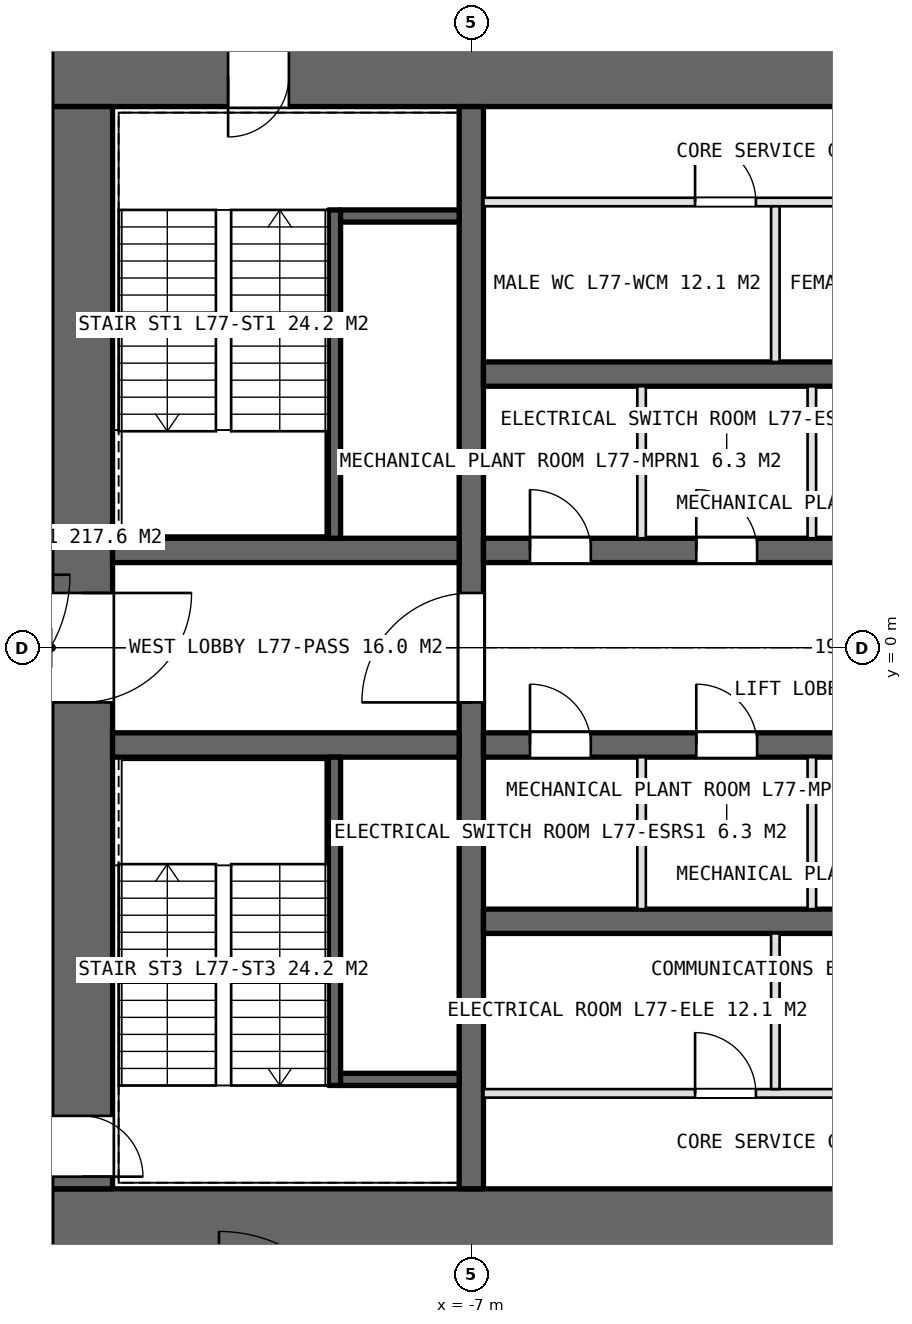
"""IFC4 building model, lengths in metres.
Left out: names, types, materials, properties, quantities, classifications, styles, units other than length and angle.
Written with IfcOpenShell. Run it as: python <this file> out.ifc"""

import sys

from ifc_helpers import new_model, si_unit, direction, frame, frame_2d, origin, place, context, subcontext, project, spatial, rectangle, extrude, element, fill, save


model = new_model("IFC4")
c1 = context("Model", 3, precision=1e-05, world=origin(), true_north=direction((0.0, 1.0)))
c2 = subcontext(c1, "Body", "Model", "MODEL_VIEW")
j1 = project(units=[si_unit("LENGTHUNIT", "METRE"), si_unit("PLANEANGLEUNIT", "RADIAN")], contexts=[c1])
p1 = place(None, origin())
s1 = spatial("IfcSite", under=j1, at=p1, CompositionType="ELEMENT")
p2 = place(p1, origin())
s2 = spatial("IfcBuilding", under=s1, at=p2, CompositionType="ELEMENT")
p3 = place(p2, frame((0.0, 0.0, 344.2)))
s3 = spatial("IfcBuildingStorey", under=s2, at=p3, CompositionType="ELEMENT", Elevation=344.2)
p4 = place(p3, frame((-13.9, -9.4, 0.0), z_axis=(0.0, 0.0, 1.0), x_axis=(1.0, 0.0, 0.0)))
e1 = element("IfcWall", 1, at=p4, inside=s3, PredefinedType="SHEAR", context=c2, shape_type="SweptSolid", body=[
    extrude(rectangle(XDim=27.8, YDim=1.0, at=frame_2d((13.9, 0.0))), origin(), (0.0, 0.0, 1.0), 5.0),
])
p5 = place(p4, frame((13.0, 0.0, 0.0)))
e2 = element("IfcOpeningElement", 2, at=p5, cuts=e1, PredefinedType="OPENING", context=c2, shape_type="SweptSolid", body=[
    extrude(rectangle(XDim=1.8, YDim=2.4, at=frame_2d((0.9, 1.2))), frame((0.0, 0.51, 0.0), z_axis=(0.0, -1.0, 0.0), x_axis=(1.0, 0.0, 0.0)), (0.0, 0.0, 1.0), 1.02),
])
p6 = place(p4, frame((22.95, 0.0, 0.0)))
e3 = element("IfcOpeningElement", 3, at=p6, cuts=e1, PredefinedType="OPENING", context=c2, shape_type="SweptSolid", body=[
    extrude(rectangle(XDim=2.2, YDim=2.7, at=frame_2d((1.1, 1.35))), frame((0.0, 0.51, 0.0), z_axis=(0.0, -1.0, 0.0), x_axis=(1.0, 0.0, 0.0)), (0.0, 0.0, 1.0), 1.02),
])
p7 = place(p3, frame((13.9, 9.4, 0.0), z_axis=(0.0, 0.0, 1.0), x_axis=(-1.0, 0.0, 0.0)))
e4 = element("IfcWall", 4, at=p7, inside=s3, PredefinedType="SHEAR", context=c2, shape_type="SweptSolid", body=[
    extrude(rectangle(XDim=27.8, YDim=1.0, at=frame_2d((13.9, 0.0))), origin(), (0.0, 0.0, 1.0), 5.0),
])
p8 = place(p7, frame((23.9, 0.0, 0.0)))
e5 = element("IfcOpeningElement", 5, at=p8, cuts=e4, PredefinedType="OPENING", context=c2, shape_type="SweptSolid", body=[
    extrude(rectangle(XDim=1.0, YDim=2.4, at=frame_2d((0.5, 1.2))), frame((0.0, 0.51, 0.0), z_axis=(0.0, -1.0, 0.0), x_axis=(1.0, 0.0, 0.0)), (0.0, 0.0, 1.0), 1.02),
])
p9 = place(p7, frame((13.0, 0.0, 0.0)))
e6 = element("IfcOpeningElement", 6, at=p9, cuts=e4, PredefinedType="OPENING", context=c2, shape_type="SweptSolid", body=[
    extrude(rectangle(XDim=1.8, YDim=2.4, at=frame_2d((0.9, 1.2))), frame((0.0, 0.51, 0.0), z_axis=(0.0, -1.0, 0.0), x_axis=(1.0, 0.0, 0.0)), (0.0, 0.0, 1.0), 1.02),
])
p10 = place(p3, frame((-13.4, 8.9, 0.0), z_axis=(0.0, 0.0, 1.0), x_axis=(0.0, -1.0, 0.0)))
e7 = element("IfcWall", 7, at=p10, inside=s3, PredefinedType="SHEAR", context=c2, shape_type="SweptSolid", body=[
    extrude(rectangle(XDim=17.8, YDim=1.0, at=frame_2d((8.9, 0.0))), origin(), (0.0, 0.0, 1.0), 5.0),
])
p11 = place(p10, frame((8.0, 0.0, 0.0)))
e8 = element("IfcOpeningElement", 8, at=p11, cuts=e7, PredefinedType="OPENING", context=c2, shape_type="SweptSolid", body=[
    extrude(rectangle(XDim=1.8, YDim=2.4, at=frame_2d((0.9, 1.2))), frame((0.0, 0.51, 0.0), z_axis=(0.0, -1.0, 0.0), x_axis=(1.0, 0.0, 0.0)), (0.0, 0.0, 1.0), 1.02),
])
p12 = place(p10, frame((16.6, 0.0, 0.0)))
e9 = element("IfcOpeningElement", 9, at=p12, cuts=e7, PredefinedType="OPENING", context=c2, shape_type="SweptSolid", body=[
    extrude(rectangle(XDim=1.0, YDim=2.4, at=frame_2d((0.5, 1.2))), frame((0.0, 0.51, 0.0), z_axis=(0.0, -1.0, 0.0), x_axis=(1.0, 0.0, 0.0)), (0.0, 0.0, 1.0), 1.02),
])
p13 = place(p3, frame((-7.0, -8.9, 0.0), z_axis=(0.0, 0.0, 1.0), x_axis=(0.0, 1.0, 0.0)))
e10 = element("IfcWall", 10, at=p13, inside=s3, PredefinedType="SHEAR", context=c2, shape_type="SweptSolid", body=[
    extrude(rectangle(XDim=17.8, YDim=0.4, at=frame_2d((8.9, 0.0))), origin(), (0.0, 0.0, 1.0), 5.0),
])
p14 = place(p13, frame((8.0, 0.0, 0.0)))
e11 = element("IfcOpeningElement", 11, at=p14, cuts=e10, PredefinedType="OPENING", context=c2, shape_type="SweptSolid", body=[
    extrude(rectangle(XDim=1.8, YDim=2.4, at=frame_2d((0.9, 1.2))), frame((0.0, 0.21, 0.0), z_axis=(0.0, -1.0, 0.0), x_axis=(1.0, 0.0, 0.0)), (0.0, 0.0, 1.0), 0.42),
])
p15 = place(p3, frame((-6.8, 1.6, 0.0), z_axis=(0.0, 0.0, 1.0), x_axis=(1.0, 0.0, 0.0)))
e12 = element("IfcWall", 12, at=p15, inside=s3, PredefinedType="SHEAR", context=c2, shape_type="SweptSolid", body=[
    extrude(rectangle(XDim=13.6, YDim=0.4, at=frame_2d((6.8, 0.0))), origin(), (0.0, 0.0, 1.0), 5.0),
])
p16 = place(p15, frame((0.765, 0.0, 0.0)))
e13 = element("IfcOpeningElement", 13, at=p16, cuts=e12, PredefinedType="OPENING", context=c2, shape_type="SweptSolid", body=[
    extrude(rectangle(XDim=1.0, YDim=2.4, at=frame_2d((0.5, 1.2))), frame((0.0, 0.21, 0.0), z_axis=(0.0, -1.0, 0.0), x_axis=(1.0, 0.0, 0.0)), (0.0, 0.0, 1.0), 0.42),
])
p17 = place(p15, frame((3.5, 0.0, 0.0)))
e14 = element("IfcOpeningElement", 14, at=p17, cuts=e12, PredefinedType="OPENING", context=c2, shape_type="SweptSolid", body=[
    extrude(rectangle(XDim=1.0, YDim=2.4, at=frame_2d((0.5, 1.2))), frame((0.0, 0.21, 0.0), z_axis=(0.0, -1.0, 0.0), x_axis=(1.0, 0.0, 0.0)), (0.0, 0.0, 1.0), 0.42),
])
p18 = place(p15, frame((6.3, 0.0, 0.0)))
e15 = element("IfcOpeningElement", 15, at=p18, cuts=e12, PredefinedType="OPENING", context=c2, shape_type="SweptSolid", body=[
    extrude(rectangle(XDim=1.0, YDim=2.4, at=frame_2d((0.5, 1.2))), frame((0.0, 0.21, 0.0), z_axis=(0.0, -1.0, 0.0), x_axis=(1.0, 0.0, 0.0)), (0.0, 0.0, 1.0), 0.42),
])
p19 = place(p15, frame((9.035, 0.0, 0.0)))
e16 = element("IfcOpeningElement", 16, at=p19, cuts=e12, PredefinedType="OPENING", context=c2, shape_type="SweptSolid", body=[
    extrude(rectangle(XDim=1.0, YDim=2.4, at=frame_2d((0.5, 1.2))), frame((0.0, 0.21, 0.0), z_axis=(0.0, -1.0, 0.0), x_axis=(1.0, 0.0, 0.0)), (0.0, 0.0, 1.0), 0.42),
])
p20 = place(p15, frame((11.9, 0.0, 0.0)))
e17 = element("IfcOpeningElement", 17, at=p20, cuts=e12, PredefinedType="OPENING", context=c2, shape_type="SweptSolid", body=[
    extrude(rectangle(XDim=1.0, YDim=2.4, at=frame_2d((0.5, 1.2))), frame((0.0, 0.21, 0.0), z_axis=(0.0, -1.0, 0.0), x_axis=(1.0, 0.0, 0.0)), (0.0, 0.0, 1.0), 0.42),
])
p21 = place(p3, frame((-6.8, -1.6, 0.0), z_axis=(0.0, 0.0, 1.0), x_axis=(1.0, 0.0, 0.0)))
e18 = element("IfcWall", 18, at=p21, inside=s3, PredefinedType="SHEAR", context=c2, shape_type="SweptSolid", body=[
    extrude(rectangle(XDim=13.6, YDim=0.4, at=frame_2d((6.8, 0.0))), origin(), (0.0, 0.0, 1.0), 5.0),
])
p22 = place(p21, frame((0.765, 0.0, 0.0)))
e19 = element("IfcOpeningElement", 19, at=p22, cuts=e18, PredefinedType="OPENING", context=c2, shape_type="SweptSolid", body=[
    extrude(rectangle(XDim=1.0, YDim=2.4, at=frame_2d((0.5, 1.2))), frame((0.0, 0.21, 0.0), z_axis=(0.0, -1.0, 0.0), x_axis=(1.0, 0.0, 0.0)), (0.0, 0.0, 1.0), 0.42),
])
p23 = place(p21, frame((3.5, 0.0, 0.0)))
e20 = element("IfcOpeningElement", 20, at=p23, cuts=e18, PredefinedType="OPENING", context=c2, shape_type="SweptSolid", body=[
    extrude(rectangle(XDim=1.0, YDim=2.4, at=frame_2d((0.5, 1.2))), frame((0.0, 0.21, 0.0), z_axis=(0.0, -1.0, 0.0), x_axis=(1.0, 0.0, 0.0)), (0.0, 0.0, 1.0), 0.42),
])
p24 = place(p21, frame((6.3, 0.0, 0.0)))
e21 = element("IfcOpeningElement", 21, at=p24, cuts=e18, PredefinedType="OPENING", context=c2, shape_type="SweptSolid", body=[
    extrude(rectangle(XDim=1.0, YDim=2.4, at=frame_2d((0.5, 1.2))), frame((0.0, 0.21, 0.0), z_axis=(0.0, -1.0, 0.0), x_axis=(1.0, 0.0, 0.0)), (0.0, 0.0, 1.0), 0.42),
])
p25 = place(p21, frame((9.035, 0.0, 0.0)))
e22 = element("IfcOpeningElement", 22, at=p25, cuts=e18, PredefinedType="OPENING", context=c2, shape_type="SweptSolid", body=[
    extrude(rectangle(XDim=1.0, YDim=2.4, at=frame_2d((0.5, 1.2))), frame((0.0, 0.21, 0.0), z_axis=(0.0, -1.0, 0.0), x_axis=(1.0, 0.0, 0.0)), (0.0, 0.0, 1.0), 0.42),
])
p26 = place(p21, frame((11.9, 0.0, 0.0)))
e23 = element("IfcOpeningElement", 23, at=p26, cuts=e18, PredefinedType="OPENING", context=c2, shape_type="SweptSolid", body=[
    extrude(rectangle(XDim=1.0, YDim=2.4, at=frame_2d((0.5, 1.2))), frame((0.0, 0.21, 0.0), z_axis=(0.0, -1.0, 0.0), x_axis=(1.0, 0.0, 0.0)), (0.0, 0.0, 1.0), 0.42),
])
for number, where, z_axis, x_axis in (
    (24, (-6.8, 4.5, 0.0), (0.0, 0.0, 1.0), (1.0, 0.0, 0.0)),
    (25, (-6.8, -4.5, 0.0), (0.0, 0.0, 1.0), (1.0, 0.0, 0.0)),
):
    element("IfcWall", number, at=place(p3, frame(where, z_axis=z_axis, x_axis=x_axis)), inside=s3, PredefinedType="SHEAR", context=c2, shape_type="SweptSolid", body=[
        extrude(rectangle(XDim=13.6, YDim=0.4, at=frame_2d((6.8, 0.0))), origin(), (0.0, 0.0, 1.0), 5.0),
    ])
for number, where, z_axis, x_axis in (
    (26, (-12.9, 1.6, 0.0), (0.0, 0.0, 1.0), (1.0, 0.0, 0.0)),
    (27, (-12.9, -1.6, 0.0), (0.0, 0.0, 1.0), (1.0, 0.0, 0.0)),
):
    element("IfcWall", number, at=place(p3, frame(where, z_axis=z_axis, x_axis=x_axis)), inside=s3, PredefinedType="SHEAR", context=c2, shape_type="SweptSolid", body=[
        extrude(rectangle(XDim=5.7, YDim=0.4, at=frame_2d((2.85, 0.0))), origin(), (0.0, 0.0, 1.0), 5.0),
    ])
p27 = place(p3, frame((-6.8, 7.33, 0.0), z_axis=(0.0, 0.0, 1.0), x_axis=(1.0, 0.0, 0.0)))
e28 = element("IfcWall", 28, at=p27, inside=s3, PredefinedType="PARTITIONING", context=c2, shape_type="SweptSolid", body=[
    extrude(rectangle(XDim=13.6, YDim=0.14, at=frame_2d((6.8, 0.0))), origin(), (0.0, 0.0, 1.0), 4.7),
])
p28 = place(p27, frame((3.48, 0.0, 0.0)))
e29 = element("IfcOpeningElement", 29, at=p28, cuts=e28, PredefinedType="OPENING", context=c2, shape_type="SweptSolid", body=[
    extrude(rectangle(XDim=1.0, YDim=2.4, at=frame_2d((0.5, 1.2))), frame((0.0, 0.08, 0.0), z_axis=(0.0, -1.0, 0.0), x_axis=(1.0, 0.0, 0.0)), (0.0, 0.0, 1.0), 0.16),
])
p29 = place(p27, frame((7.98, 0.0, 0.0)))
e30 = element("IfcOpeningElement", 30, at=p29, cuts=e28, PredefinedType="OPENING", context=c2, shape_type="SweptSolid", body=[
    extrude(rectangle(XDim=1.0, YDim=2.4, at=frame_2d((0.5, 1.2))), frame((0.0, 0.08, 0.0), z_axis=(0.0, -1.0, 0.0), x_axis=(1.0, 0.0, 0.0)), (0.0, 0.0, 1.0), 0.16),
])
p30 = place(p27, frame((10.38, 0.0, 0.0)))
e31 = element("IfcOpeningElement", 31, at=p30, cuts=e28, PredefinedType="OPENING", context=c2, shape_type="SweptSolid", body=[
    extrude(rectangle(XDim=1.1, YDim=2.4, at=frame_2d((0.55, 1.2))), frame((0.0, 0.08, 0.0), z_axis=(0.0, -1.0, 0.0), x_axis=(1.0, 0.0, 0.0)), (0.0, 0.0, 1.0), 0.16),
])
p31 = place(p27, frame((12.45, 0.0, 0.0)))
e32 = element("IfcOpeningElement", 32, at=p31, cuts=e28, PredefinedType="OPENING", context=c2, shape_type="SweptSolid", body=[
    extrude(rectangle(XDim=0.9, YDim=2.4, at=frame_2d((0.45, 1.2))), frame((0.0, 0.08, 0.0), z_axis=(0.0, -1.0, 0.0), x_axis=(1.0, 0.0, 0.0)), (0.0, 0.0, 1.0), 0.16),
])
p32 = place(p3, frame((-2.0, 4.7, 0.0), z_axis=(0.0, 0.0, 1.0), x_axis=(0.0, 1.0, 0.0)))
e33 = element("IfcWall", 33, at=p32, inside=s3, PredefinedType="PARTITIONING", context=c2, shape_type="SweptSolid", body=[
    extrude(rectangle(XDim=2.56, YDim=0.14, at=frame_2d((1.28, 0.0))), origin(), (0.0, 0.0, 1.0), 4.7),
])
p33 = place(p3, frame((-6.8, -7.33, 0.0), z_axis=(0.0, 0.0, 1.0), x_axis=(1.0, 0.0, 0.0)))
e34 = element("IfcWall", 34, at=p33, inside=s3, PredefinedType="PARTITIONING", context=c2, shape_type="SweptSolid", body=[
    extrude(rectangle(XDim=13.6, YDim=0.14, at=frame_2d((6.8, 0.0))), origin(), (0.0, 0.0, 1.0), 4.7),
])
p34 = place(p33, frame((3.48, 0.0, 0.0)))
e35 = element("IfcOpeningElement", 35, at=p34, cuts=e34, PredefinedType="OPENING", context=c2, shape_type="SweptSolid", body=[
    extrude(rectangle(XDim=1.0, YDim=2.4, at=frame_2d((0.5, 1.2))), frame((0.0, 0.08, 0.0), z_axis=(0.0, -1.0, 0.0), x_axis=(1.0, 0.0, 0.0)), (0.0, 0.0, 1.0), 0.16),
])
p35 = place(p33, frame((7.98, 0.0, 0.0)))
e36 = element("IfcOpeningElement", 36, at=p35, cuts=e34, PredefinedType="OPENING", context=c2, shape_type="SweptSolid", body=[
    extrude(rectangle(XDim=1.0, YDim=2.4, at=frame_2d((0.5, 1.2))), frame((0.0, 0.08, 0.0), z_axis=(0.0, -1.0, 0.0), x_axis=(1.0, 0.0, 0.0)), (0.0, 0.0, 1.0), 0.16),
])
p36 = place(p33, frame((12.35, 0.0, 0.0)))
e37 = element("IfcOpeningElement", 37, at=p36, cuts=e34, PredefinedType="OPENING", context=c2, shape_type="SweptSolid", body=[
    extrude(rectangle(XDim=1.0, YDim=2.4, at=frame_2d((0.5, 1.2))), frame((0.0, 0.08, 0.0), z_axis=(0.0, -1.0, 0.0), x_axis=(1.0, 0.0, 0.0)), (0.0, 0.0, 1.0), 0.16),
])
p37 = place(p3, frame((-2.0, -4.7, 0.0), z_axis=(0.0, 0.0, 1.0), x_axis=(0.0, -1.0, 0.0)))
e38 = element("IfcWall", 38, at=p37, inside=s3, PredefinedType="PARTITIONING", context=c2, shape_type="SweptSolid", body=[
    extrude(rectangle(XDim=2.56, YDim=0.14, at=frame_2d((1.28, 0.0))), origin(), (0.0, 0.0, 1.0), 4.7),
])
for number, where, z_axis, x_axis in (
    (39, (-4.2, 1.8, 0.0), (0.0, 0.0, 1.0), (0.0, 1.0, 0.0)),
    (40, (-1.4, 1.8, 0.0), (0.0, 0.0, 1.0), (0.0, 1.0, 0.0)),
    (41, (-4.2, -1.8, 0.0), (0.0, 0.0, 1.0), (0.0, -1.0, 0.0)),
    (42, (-1.4, -1.8, 0.0), (0.0, 0.0, 1.0), (0.0, -1.0, 0.0)),
):
    element("IfcWall", number, at=place(p3, frame(where, z_axis=z_axis, x_axis=x_axis)), inside=s3, PredefinedType="PARTITIONING", context=c2, shape_type="SweptSolid", body=[
        extrude(rectangle(XDim=2.5, YDim=0.14, at=frame_2d((1.25, 0.0))), origin(), (0.0, 0.0, 1.0), 4.7),
    ])
p38 = place(p3, frame((-9.25, 7.2, 0.0), z_axis=(0.0, 0.0, 1.0), x_axis=(0.0, -1.0, 0.0)))
e43 = element("IfcWall", 43, at=p38, inside=s3, PredefinedType="SOLIDWALL", context=c2, shape_type="SweptSolid", body=[
    extrude(rectangle(XDim=5.4, YDim=0.2, at=frame_2d((2.7, 0.0))), origin(), (0.0, 0.0, 1.0), 5.0),
])
p39 = place(p3, frame((-9.15, 7.1, 0.0), z_axis=(0.0, 0.0, 1.0), x_axis=(1.0, 0.0, 0.0)))
e44 = element("IfcWall", 44, at=p39, inside=s3, PredefinedType="SOLIDWALL", context=c2, shape_type="SweptSolid", body=[
    extrude(rectangle(XDim=1.95, YDim=0.2, at=frame_2d((0.975, 0.0))), origin(), (0.0, 0.0, 1.0), 5.0),
])
p40 = place(p3, frame((-9.25, -7.2, 0.0), z_axis=(0.0, 0.0, 1.0), x_axis=(0.0, 1.0, 0.0)))
e45 = element("IfcWall", 45, at=p40, inside=s3, PredefinedType="SOLIDWALL", context=c2, shape_type="SweptSolid", body=[
    extrude(rectangle(XDim=5.4, YDim=0.2, at=frame_2d((2.7, 0.0))), origin(), (0.0, 0.0, 1.0), 5.0),
])
p41 = place(p3, frame((-9.15, -7.1, 0.0), z_axis=(0.0, 0.0, 1.0), x_axis=(1.0, 0.0, 0.0)))
e46 = element("IfcWall", 46, at=p41, inside=s3, PredefinedType="SOLIDWALL", context=c2, shape_type="SweptSolid", body=[
    extrude(rectangle(XDim=1.95, YDim=0.2, at=frame_2d((0.975, 0.0))), origin(), (0.0, 0.0, 1.0), 5.0),
])
p42 = place(p11, origin())
e47 = element("IfcDoor", 47, at=p42, inside=s3, OperationType="DOUBLE_DOOR_SINGLE_SWING", PredefinedType="DOOR", context=c2, shape_type="SweptSolid", body=[
    extrude(rectangle(XDim=1.8, YDim=2.4, at=frame_2d((0.9, 1.2))), frame((0.0, 0.025, 0.0), z_axis=(0.0, -1.0, 0.0), x_axis=(1.0, 0.0, 0.0)), (0.0, 0.0, 1.0), 0.05),
])
fill(e8, e47)
p43 = place(p14, origin())
e48 = element("IfcDoor", 48, at=p43, inside=s3, OperationType="DOUBLE_DOOR_SINGLE_SWING", PredefinedType="DOOR", context=c2, shape_type="SweptSolid", body=[
    extrude(rectangle(XDim=1.8, YDim=2.4, at=frame_2d((0.9, 1.2))), frame((0.0, 0.025, 0.0), z_axis=(0.0, -1.0, 0.0), x_axis=(1.0, 0.0, 0.0)), (0.0, 0.0, 1.0), 0.05),
])
fill(e11, e48)
p44 = place(p8, origin())
e49 = element("IfcDoor", 49, at=p44, inside=s3, OperationType="SINGLE_SWING_RIGHT", PredefinedType="DOOR", context=c2, shape_type="SweptSolid", body=[
    extrude(rectangle(XDim=1.0, YDim=2.4, at=frame_2d((0.5, 1.2))), frame((0.0, 0.025, 0.0), z_axis=(0.0, -1.0, 0.0), x_axis=(1.0, 0.0, 0.0)), (0.0, 0.0, 1.0), 0.05),
])
fill(e5, e49)
p45 = place(p12, origin())
e50 = element("IfcDoor", 50, at=p45, inside=s3, OperationType="SINGLE_SWING_RIGHT", PredefinedType="DOOR", context=c2, shape_type="SweptSolid", body=[
    extrude(rectangle(XDim=1.0, YDim=2.4, at=frame_2d((0.5, 1.2))), frame((0.0, 0.025, 0.0), z_axis=(0.0, -1.0, 0.0), x_axis=(1.0, 0.0, 0.0)), (0.0, 0.0, 1.0), 0.05),
])
fill(e9, e50)
p46 = place(p28, origin())
e51 = element("IfcDoor", 51, at=p46, inside=s3, OperationType="SINGLE_SWING_LEFT", PredefinedType="DOOR", context=c2, shape_type="SweptSolid", body=[
    extrude(rectangle(XDim=1.0, YDim=2.4, at=frame_2d((0.5, 1.2))), frame((0.0, 0.025, 0.0), z_axis=(0.0, -1.0, 0.0), x_axis=(1.0, 0.0, 0.0)), (0.0, 0.0, 1.0), 0.05),
])
fill(e29, e51)
p47 = place(p34, origin())
e52 = element("IfcDoor", 52, at=p47, inside=s3, OperationType="SINGLE_SWING_LEFT", PredefinedType="DOOR", context=c2, shape_type="SweptSolid", body=[
    extrude(rectangle(XDim=1.0, YDim=2.4, at=frame_2d((0.5, 1.2))), frame((0.0, 0.025, 0.0), z_axis=(0.0, -1.0, 0.0), x_axis=(1.0, 0.0, 0.0)), (0.0, 0.0, 1.0), 0.05),
])
fill(e35, e52)
p48 = place(p16, origin())
e53 = element("IfcDoor", 53, at=p48, inside=s3, OperationType="SINGLE_SWING_LEFT", PredefinedType="DOOR", context=c2, shape_type="SweptSolid", body=[
    extrude(rectangle(XDim=1.0, YDim=2.4, at=frame_2d((0.5, 1.2))), frame((0.0, 0.025, 0.0), z_axis=(0.0, -1.0, 0.0), x_axis=(1.0, 0.0, 0.0)), (0.0, 0.0, 1.0), 0.05),
])
fill(e13, e53)
p49 = place(p17, origin())
e54 = element("IfcDoor", 54, at=p49, inside=s3, OperationType="SINGLE_SWING_LEFT", PredefinedType="DOOR", context=c2, shape_type="SweptSolid", body=[
    extrude(rectangle(XDim=1.0, YDim=2.4, at=frame_2d((0.5, 1.2))), frame((0.0, 0.025, 0.0), z_axis=(0.0, -1.0, 0.0), x_axis=(1.0, 0.0, 0.0)), (0.0, 0.0, 1.0), 0.05),
])
fill(e14, e54)
p50 = place(p22, origin())
e55 = element("IfcDoor", 55, at=p50, inside=s3, OperationType="SINGLE_SWING_LEFT", PredefinedType="DOOR", context=c2, shape_type="SweptSolid", body=[
    extrude(rectangle(XDim=1.0, YDim=2.4, at=frame_2d((0.5, 1.2))), frame((0.0, 0.025, 0.0), z_axis=(0.0, -1.0, 0.0), x_axis=(1.0, 0.0, 0.0)), (0.0, 0.0, 1.0), 0.05),
])
fill(e19, e55)
p51 = place(p23, origin())
e56 = element("IfcDoor", 56, at=p51, inside=s3, OperationType="SINGLE_SWING_LEFT", PredefinedType="DOOR", context=c2, shape_type="SweptSolid", body=[
    extrude(rectangle(XDim=1.0, YDim=2.4, at=frame_2d((0.5, 1.2))), frame((0.0, 0.025, 0.0), z_axis=(0.0, -1.0, 0.0), x_axis=(1.0, 0.0, 0.0)), (0.0, 0.0, 1.0), 0.05),
])
fill(e20, e56)
save(model, sys.argv[1])
